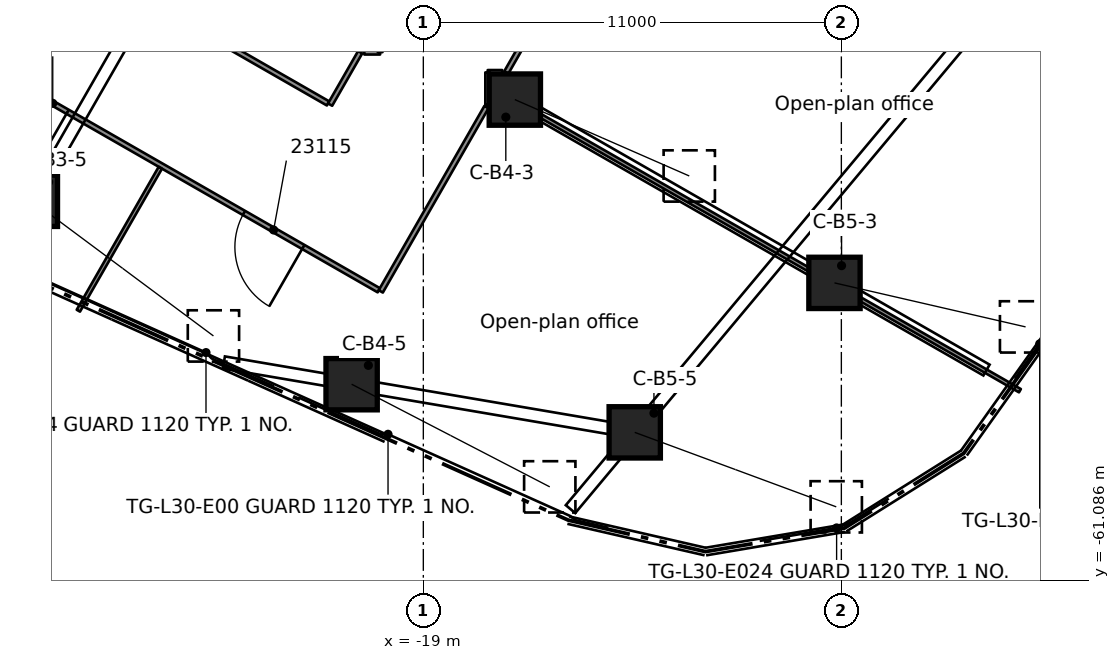
"""IFC4 building model, lengths in metres.
Left out: names, types, materials, properties, quantities, classifications, styles, units other than length and angle.
Written with IfcOpenShell. Run it as: python <this file> out.ifc"""

import sys

from ifc_helpers import new_model, si_unit, direction, frame, frame_2d, origin, origin_2d, place, context, subcontext, project, spatial, rectangle, extrude, element, fill, save


model = new_model("IFC4")
c1 = context("Model", 3, precision=1e-05, world=origin(), true_north=direction((0.0, 1.0)))
c2 = subcontext(c1, "Body", "Model", "MODEL_VIEW")
j1 = project(units=[si_unit("LENGTHUNIT", "METRE"), si_unit("PLANEANGLEUNIT", "RADIAN")], contexts=[c1])
p1 = place(None, origin())
s1 = spatial("IfcSite", under=j1, at=p1, CompositionType="ELEMENT")
p2 = place(p1, origin())
s2 = spatial("IfcBuilding", under=s1, at=p2, CompositionType="ELEMENT")
p3 = place(p2, frame((0.0, 0.0, 119.7)))
s3 = spatial("IfcBuildingStorey", under=s2, at=p3, CompositionType="ELEMENT", Elevation=119.7)
p4 = place(p3, frame((-25.007, -43.605, 0.589), z_axis=(0.718653578755, -0.495359605874, 0.488012186948), x_axis=(0.567528313926, 0.823353880718, 0.0)))
e1 = element("IfcColumn", 1, at=p4, inside=s3, PredefinedType="COLUMN", context=c2, shape_type="SweptSolid", body=[
    extrude(rectangle(XDim=1.35, YDim=1.35, at=origin_2d()), origin(), (0.0, 0.0, 1.0), 5.782),
])
p5 = place(p3, frame((-29.301, -51.094, 0.612), z_axis=(0.727106660738, -0.54112250338, 0.422495373047), x_axis=(0.597024879734, 0.802222720308, 0.0)))
e2 = element("IfcColumn", 2, at=p5, inside=s3, PredefinedType="COLUMN", context=c2, shape_type="SweptSolid", body=[
    extrude(rectangle(XDim=1.35, YDim=1.35, at=origin_2d()), origin(), (0.0, 0.0, 1.0), 6.571),
])
p6 = place(p3, frame((-16.592, -48.431, 0.588), z_axis=(0.798018191469, -0.349453953001, 0.490967311352), x_axis=(0.401128075959, 0.916021979364, 0.0)))
e3 = element("IfcColumn", 3, at=p6, inside=s3, PredefinedType="COLUMN", context=c2, shape_type="SweptSolid", body=[
    extrude(rectangle(XDim=1.35, YDim=1.35, at=origin_2d()), origin(), (0.0, 0.0, 1.0), 5.752),
])
p7 = place(p3, frame((-20.887, -55.92, 0.61), z_axis=(0.802532917271, -0.415771876601, 0.427872251173), x_axis=(0.460006455938, 0.88791557059, 0.0)))
e4 = element("IfcColumn", 4, at=p7, inside=s3, PredefinedType="COLUMN", context=c2, shape_type="SweptSolid", body=[
    extrude(rectangle(XDim=1.35, YDim=1.35, at=origin_2d()), origin(), (0.0, 0.0, 1.0), 6.497),
])
p8 = place(p3, frame((-8.181, -53.254, 0.593), z_axis=(0.855488939096, -0.197030756727, 0.478871126701), x_axis=(0.224437949538, 0.974488382079, 0.0)))
e5 = element("IfcColumn", 5, at=p8, inside=s3, PredefinedType="COLUMN", context=c2, shape_type="SweptSolid", body=[
    extrude(rectangle(XDim=1.35, YDim=1.35, at=origin_2d()), origin(), (0.0, 0.0, 1.0), 5.878),
])
p9 = place(p3, frame((-13.437, -57.187, 0.605), z_axis=(0.841178426965, -0.310896386523, 0.442450325863), x_axis=(0.346675745492, 0.937985035855, 0.0)))
e6 = element("IfcColumn", 6, at=p9, inside=s3, PredefinedType="COLUMN", context=c2, shape_type="SweptSolid", body=[
    extrude(rectangle(XDim=1.35, YDim=1.35, at=origin_2d()), origin(), (0.0, 0.0, 1.0), 6.304),
])
p10 = place(p3, frame((-20.171, -53.449, 0.0), z_axis=(0.0, 0.0, 1.0), x_axis=(-0.867500052813, 0.497437089861, 0.0)))
e7 = element("IfcWall", 7, at=p10, inside=s3, PredefinedType="PARTITIONING", context=c2, shape_type="SweptSolid", body=[
    extrude(rectangle(XDim=13.179, YDim=0.125, at=frame_2d((6.59, 0.0))), origin(), (0.0, 0.0, 1.0), 3.58),
])
p11 = place(p10, frame((2.292, 0.0, 0.0)))
e8 = element("IfcOpeningElement", 8, at=p11, cuts=e7, PredefinedType="OPENING", context=c2, shape_type="SweptSolid", body=[
    extrude(rectangle(XDim=1.8, YDim=2.1, at=frame_2d((0.9, 1.05))), frame((0.0, 0.073, 0.0), z_axis=(0.0, -1.0, 0.0), x_axis=(1.0, 0.0, 0.0)), (0.0, 0.0, 1.0), 0.145),
])
p12 = place(p10, frame((9.441, 0.0, 0.0)))
e9 = element("IfcOpeningElement", 9, at=p12, cuts=e7, PredefinedType="OPENING", context=c2, shape_type="SweptSolid", body=[
    extrude(rectangle(XDim=0.9, YDim=2.1, at=frame_2d((0.45, 1.05))), frame((0.0, 0.073, 0.0), z_axis=(0.0, -1.0, 0.0), x_axis=(1.0, 0.0, 0.0)), (0.0, 0.0, 1.0), 0.145),
])
p13 = place(p3, frame((-26.689, -45.56, 0.0), z_axis=(0.0, 0.0, 1.0), x_axis=(0.867459879492, -0.497507143136, 0.0)))
e10 = element("IfcWall", 10, at=p13, inside=s3, PredefinedType="PARTITIONING", context=c2, shape_type="SweptSolid", body=[
    extrude(rectangle(XDim=5.974, YDim=0.125, at=frame_2d((2.987, 0.0))), origin(), (0.0, 0.0, 1.0), 3.58),
])
p14 = place(p3, frame((-17.219, -48.11, 0.0), z_axis=(0.0, 0.0, 1.0), x_axis=(0.867494881958, -0.49744610741, 0.0)))
e11 = element("IfcWall", 11, at=p14, inside=s3, PredefinedType="PARTITIONING", context=c2, shape_type="SweptSolid", body=[
    extrude(rectangle(XDim=16.044, YDim=0.1, at=frame_2d((8.022, 0.0))), origin(), (0.0, 0.0, 1.0), 3.58),
])
p15 = place(p3, frame((-12.924, -40.544, 0.0), z_axis=(0.0, 0.0, 1.0), x_axis=(0.867484083191, -0.497464938876, 0.0)))
e12 = element("IfcWall", 12, at=p15, inside=s3, PredefinedType="PARTITIONING", context=c2, shape_type="SweptSolid", body=[
    extrude(rectangle(XDim=15.519, YDim=0.1, at=frame_2d((7.759, 0.0))), origin(), (0.0, 0.0, 1.0), 3.58),
])
p16 = place(p3, frame((-17.306, -47.716, 0.0), z_axis=(0.0, 0.0, 1.0), x_axis=(1.0, 0.0, 0.0)))
e13 = element("IfcWall", 13, at=p16, inside=s3, PredefinedType="PARTITIONING", context=c2, shape_type="SweptSolid", body=[
    extrude(rectangle(XDim=0.382, YDim=0.125, at=frame_2d((0.191, 0.0))), origin(), (0.0, 0.0, 1.0), 3.58),
])
p17 = place(p3, frame((-20.553, -47.183, 0.0), z_axis=(0.0, 0.0, 1.0), x_axis=(1.0, 0.0, 0.0)))
e14 = element("IfcWall", 14, at=p17, inside=s3, PredefinedType="PARTITIONING", context=c2, shape_type="SweptSolid", body=[
    extrude(rectangle(XDim=0.416, YDim=0.125, at=frame_2d((0.208, 0.0))), origin(), (0.0, 0.0, 1.0), 3.58),
])
p18 = place(p3, frame((-21.453, -48.563, 0.0), z_axis=(0.0, 0.0, 1.0), x_axis=(0.497743370952, 0.867324354941, 0.0)))
e15 = element("IfcWall", 15, at=p18, inside=s3, PredefinedType="PARTITIONING", context=c2, shape_type="SweptSolid", body=[
    extrude(rectangle(XDim=1.589, YDim=0.125, at=frame_2d((0.794, 0.0))), origin(), (0.0, 0.0, 1.0), 3.58),
])
p19 = place(p3, frame((-20.12, -53.478, 0.0), z_axis=(0.0, 0.0, 1.0), x_axis=(0.497511151809, 0.867457580418, 0.0)))
e16 = element("IfcWall", 16, at=p19, inside=s3, PredefinedType="PARTITIONING", context=c2, shape_type="SweptSolid", body=[
    extrude(rectangle(XDim=5.592, YDim=0.125, at=frame_2d((2.796, 0.0))), origin(), (0.0, 0.0, 1.0), 3.58),
])
p20 = place(p3, frame((-13.043, -41.137, 0.0), z_axis=(0.0, 0.0, 1.0), x_axis=(-0.497476495559, -0.867477455826, 0.0)))
e17 = element("IfcWall", 17, at=p20, inside=s3, PredefinedType="PARTITIONING", context=c2, shape_type="SweptSolid", body=[
    extrude(rectangle(XDim=7.584, YDim=0.125, at=frame_2d((3.792, 0.0))), origin(), (0.0, 0.0, 1.0), 3.58),
])
p21 = place(p20, frame((2.788, 0.0, 0.0)))
e18 = element("IfcOpeningElement", 18, at=p21, cuts=e17, PredefinedType="OPENING", context=c2, shape_type="SweptSolid", body=[
    extrude(rectangle(XDim=1.8, YDim=2.1, at=frame_2d((0.9, 1.05))), frame((0.0, 0.073, 0.0), z_axis=(0.0, -1.0, 0.0), x_axis=(1.0, 0.0, 0.0)), (0.0, 0.0, 1.0), 0.145),
])
p22 = place(p3, frame((-28.078, -53.986, 0.0), z_axis=(0.0, 0.0, 1.0), x_axis=(0.497575033099, 0.867420939588, 0.0)))
e19 = element("IfcWall", 19, at=p22, inside=s3, PredefinedType="PARTITIONING", context=c2, shape_type="SweptSolid", body=[
    extrude(rectangle(XDim=4.337, YDim=0.1, at=frame_2d((2.168, 0.0))), origin(), (0.0, 0.0, 1.0), 3.58),
])
p23 = place(p3, frame((-17.306, -48.572, 0.0), z_axis=(0.0, 0.0, 1.0), x_axis=(0.0, 1.0, 0.0)))
e20 = element("IfcWall", 20, at=p23, inside=s3, PredefinedType="PARTITIONING", context=c2, shape_type="SweptSolid", body=[
    extrude(rectangle(XDim=0.856, YDim=0.125, at=frame_2d((0.428, 0.0))), origin(), (0.0, 0.0, 1.0), 3.58),
])
p24 = place(p11, origin())
e21 = element("IfcDoor", 21, at=p24, inside=s3, OperationType="DOUBLE_DOOR_SINGLE_SWING", PredefinedType="DOOR", context=c2, shape_type="SweptSolid", body=[
    extrude(rectangle(XDim=1.8, YDim=2.1, at=frame_2d((0.9, 1.05))), frame((0.0, 0.025, 0.0), z_axis=(0.0, -1.0, 0.0), x_axis=(1.0, 0.0, 0.0)), (0.0, 0.0, 1.0), 0.05),
])
fill(e8, e21)
p25 = place(p12, origin())
e22 = element("IfcDoor", 22, at=p25, inside=s3, OperationType="SINGLE_SWING_RIGHT", PredefinedType="DOOR", context=c2, shape_type="SweptSolid", body=[
    extrude(rectangle(XDim=0.9, YDim=2.1, at=frame_2d((0.45, 1.05))), frame((0.0, 0.025, 0.0), z_axis=(0.0, -1.0, 0.0), x_axis=(1.0, 0.0, 0.0)), (0.0, 0.0, 1.0), 0.05),
])
fill(e9, e22)
save(model, sys.argv[1])
